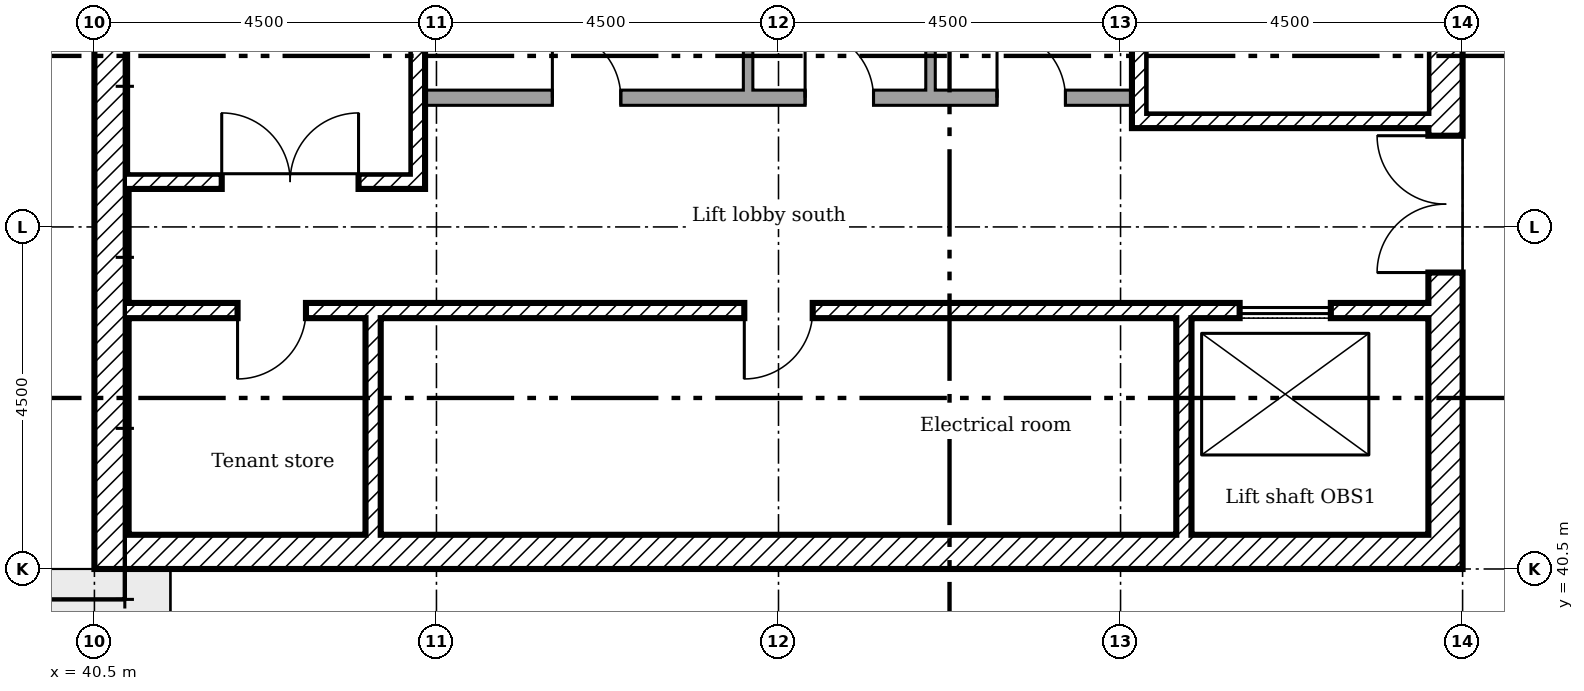
"""IFC4 building model, lengths in metres.
Left out: names, types, materials, properties, quantities, classifications, styles, units other than length and angle.
Written with IfcOpenShell. Run it as: python <this file> out.ifc"""

import sys

from ifc_helpers import new_model, si_unit, direction, frame, frame_2d, origin, place, context, subcontext, project, spatial, rectangle, extrude, element, fill, save


model = new_model("IFC4")
c1 = context("Model", 3, precision=1e-05, world=origin(), true_north=direction((0.0, 1.0)))
c2 = subcontext(c1, "Body", "Model", "MODEL_VIEW")
j1 = project(units=[si_unit("LENGTHUNIT", "METRE"), si_unit("PLANEANGLEUNIT", "RADIAN")], contexts=[c1])
p1 = place(None, origin())
s1 = spatial("IfcSite", under=j1, at=p1, CompositionType="ELEMENT")
p2 = place(p1, origin())
s2 = spatial("IfcBuilding", under=s1, at=p2, CompositionType="ELEMENT")
p3 = place(p2, frame((0.0, 0.0, 269.6)))
s3 = spatial("IfcBuildingStorey", under=s2, at=p3, CompositionType="ELEMENT", Elevation=269.6)
p4 = place(p3, frame((58.275, 40.5, 0.0), z_axis=(0.0, 0.0, 1.0), x_axis=(0.0, 1.0, 0.0)))
e1 = element("IfcWall", 1, at=p4, inside=s3, PredefinedType="SHEAR", context=c2, shape_type="SweptSolid", body=[
    extrude(rectangle(XDim=18.0, YDim=0.45, at=frame_2d((9.0, 0.0))), origin(), (0.0, 0.0, 1.0), 4.75),
])
p5 = place(p4, frame((13.15, 0.0, 0.0)))
e2 = element("IfcOpeningElement", 2, at=p5, cuts=e1, PredefinedType="OPENING", context=c2, shape_type="SweptSolid", body=[
    extrude(rectangle(XDim=1.2, YDim=2.1, at=frame_2d((0.6, 1.05))), frame((0.0, 0.235, 0.0), z_axis=(0.0, -1.0, 0.0), x_axis=(1.0, 0.0, 0.0)), (0.0, 0.0, 1.0), 0.47),
])
p6 = place(p4, frame((3.9, 0.0, 0.0)))
e3 = element("IfcOpeningElement", 3, at=p6, cuts=e1, PredefinedType="OPENING", context=c2, shape_type="SweptSolid", body=[
    extrude(rectangle(XDim=1.8, YDim=2.1, at=frame_2d((0.9, 1.05))), frame((0.0, 0.235, 0.0), z_axis=(0.0, -1.0, 0.0), x_axis=(1.0, 0.0, 0.0)), (0.0, 0.0, 1.0), 0.47),
])
p7 = place(p4, frame((11.34, 0.0, 0.0)))
e4 = element("IfcOpeningElement", 4, at=p7, cuts=e1, PredefinedType="OPENING", context=c2, shape_type="SweptSolid", body=[
    extrude(rectangle(XDim=1.2, YDim=2.1, at=frame_2d((0.6, 1.05))), frame((0.0, 0.235, 0.0), z_axis=(0.0, -1.0, 0.0), x_axis=(1.0, 0.0, 0.0)), (0.0, 0.0, 1.0), 0.47),
])
p8 = place(p3, frame((40.5, 40.725, 0.0)))
e5 = element("IfcWall", 5, at=p8, inside=s3, PredefinedType="SHEAR", context=c2, shape_type="SweptSolid", body=[
    extrude(rectangle(XDim=17.55, YDim=0.45, at=frame_2d((8.775, 0.0))), origin(), (0.0, 0.0, 1.0), 4.75),
])
p9 = place(p3, frame((40.725, 40.95, 0.0), z_axis=(0.0, 0.0, 1.0), x_axis=(0.0, 1.0, 0.0)))
e6 = element("IfcWall", 6, at=p9, inside=s3, PredefinedType="SHEAR", context=c2, shape_type="SweptSolid", body=[
    extrude(rectangle(XDim=17.1, YDim=0.45, at=frame_2d((8.55, 0.0))), origin(), (0.0, 0.0, 1.0), 4.75),
])
for number, where, z_axis, x_axis in (
    (7, (44.167, 40.95, 0.0), (0.0, 0.0, 1.0), (0.0, 1.0, 0.0)),
    (8, (54.833, 40.95, 0.0), (0.0, 0.0, 1.0), (0.0, 1.0, 0.0)),
):
    element("IfcWall", number, at=place(p3, frame(where, z_axis=z_axis, x_axis=x_axis)), inside=s3, PredefinedType="SHEAR", context=c2, shape_type="SweptSolid", body=[
        extrude(rectangle(XDim=2.85, YDim=0.2, at=frame_2d((1.425, 0.0))), origin(), (0.0, 0.0, 1.0), 4.75),
    ])
p10 = place(p3, frame((40.95, 43.9, 0.0)))
e9 = element("IfcWall", 9, at=p10, inside=s3, PredefinedType="SHEAR", context=c2, shape_type="SweptSolid", body=[
    extrude(rectangle(XDim=17.1, YDim=0.2, at=frame_2d((8.55, 0.0))), origin(), (0.0, 0.0, 1.0), 4.75),
])
p11 = place(p10, frame((1.433, 0.0, 0.0)))
e10 = element("IfcOpeningElement", 10, at=p11, cuts=e9, PredefinedType="OPENING", context=c2, shape_type="SweptSolid", body=[
    extrude(rectangle(XDim=0.9, YDim=2.1, at=frame_2d((0.45, 1.05))), frame((0.0, 0.11, 0.0), z_axis=(0.0, -1.0, 0.0), x_axis=(1.0, 0.0, 0.0)), (0.0, 0.0, 1.0), 0.22),
])
p12 = place(p10, frame((8.1, 0.0, 0.0)))
e11 = element("IfcOpeningElement", 11, at=p12, cuts=e9, PredefinedType="OPENING", context=c2, shape_type="SweptSolid", body=[
    extrude(rectangle(XDim=0.9, YDim=2.1, at=frame_2d((0.45, 1.05))), frame((0.0, 0.11, 0.0), z_axis=(0.0, -1.0, 0.0), x_axis=(1.0, 0.0, 0.0)), (0.0, 0.0, 1.0), 0.22),
])
p13 = place(p10, frame((14.617, 0.0, 0.0)))
e12 = element("IfcOpeningElement", 12, at=p13, cuts=e9, PredefinedType="OPENING", context=c2, shape_type="SweptSolid", body=[
    extrude(rectangle(XDim=1.2, YDim=2.1, at=frame_2d((0.6, 1.05))), frame((0.0, 0.11, 0.0), z_axis=(0.0, -1.0, 0.0), x_axis=(1.0, 0.0, 0.0)), (0.0, 0.0, 1.0), 0.22),
])
p14 = place(p3, frame((44.75, 45.5, 0.0), z_axis=(0.0, 0.0, 1.0), x_axis=(0.0, 1.0, 0.0)))
e13 = element("IfcWall", 13, at=p14, inside=s3, PredefinedType="SHEAR", context=c2, shape_type="SweptSolid", body=[
    extrude(rectangle(XDim=7.2, YDim=0.2, at=frame_2d((3.6, 0.0))), origin(), (0.0, 0.0, 1.0), 4.75),
])
p15 = place(p3, frame((40.95, 45.6, 0.0)))
e14 = element("IfcWall", 14, at=p15, inside=s3, PredefinedType="SHEAR", context=c2, shape_type="SweptSolid", body=[
    extrude(rectangle(XDim=3.7, YDim=0.2, at=frame_2d((1.85, 0.0))), origin(), (0.0, 0.0, 1.0), 4.75),
])
p16 = place(p15, frame((1.225, 0.0, 0.0)))
e15 = element("IfcOpeningElement", 15, at=p16, cuts=e14, PredefinedType="OPENING", context=c2, shape_type="SweptSolid", body=[
    extrude(rectangle(XDim=1.8, YDim=2.1, at=frame_2d((0.9, 1.05))), frame((0.0, 0.11, 0.0), z_axis=(0.0, -1.0, 0.0), x_axis=(1.0, 0.0, 0.0)), (0.0, 0.0, 1.0), 0.22),
])
p17 = place(p3, frame((54.15, 46.4, 0.0)))
e16 = element("IfcWall", 16, at=p17, inside=s3, PredefinedType="SHEAR", context=c2, shape_type="SweptSolid", body=[
    extrude(rectangle(XDim=3.9, YDim=0.2, at=frame_2d((1.95, 0.0))), origin(), (0.0, 0.0, 1.0), 4.75),
])
p18 = place(p3, frame((54.25, 46.5, 0.0), z_axis=(0.0, 0.0, 1.0), x_axis=(0.0, 1.0, 0.0)))
e17 = element("IfcWall", 17, at=p18, inside=s3, PredefinedType="SHEAR", context=c2, shape_type="SweptSolid", body=[
    extrude(rectangle(XDim=6.8, YDim=0.2, at=frame_2d((3.4, 0.0))), origin(), (0.0, 0.0, 1.0), 4.75),
])
p19 = place(p3, frame((44.85, 46.7, 0.0)))
e18 = element("IfcWall", 18, at=p19, inside=s3, PredefinedType="PARTITIONING", context=c2, shape_type="SweptSolid", body=[
    extrude(rectangle(XDim=9.3, YDim=0.2, at=frame_2d((4.65, 0.0))), origin(), (0.0, 0.0, 1.0), 4.75),
])
p20 = place(p19, frame((1.675, 0.0, 0.0)))
e19 = element("IfcOpeningElement", 19, at=p20, cuts=e18, PredefinedType="OPENING", context=c2, shape_type="SweptSolid", body=[
    extrude(rectangle(XDim=0.9, YDim=2.1, at=frame_2d((0.45, 1.05))), frame((0.0, 0.11, 0.0), z_axis=(0.0, -1.0, 0.0), x_axis=(1.0, 0.0, 0.0)), (0.0, 0.0, 1.0), 0.22),
])
p21 = place(p19, frame((5.0, 0.0, 0.0)))
e20 = element("IfcOpeningElement", 20, at=p21, cuts=e18, PredefinedType="OPENING", context=c2, shape_type="SweptSolid", body=[
    extrude(rectangle(XDim=0.9, YDim=2.1, at=frame_2d((0.45, 1.05))), frame((0.0, 0.11, 0.0), z_axis=(0.0, -1.0, 0.0), x_axis=(1.0, 0.0, 0.0)), (0.0, 0.0, 1.0), 0.22),
])
p22 = place(p19, frame((7.525, 0.0, 0.0)))
e21 = element("IfcOpeningElement", 21, at=p22, cuts=e18, PredefinedType="OPENING", context=c2, shape_type="SweptSolid", body=[
    extrude(rectangle(XDim=0.9, YDim=2.1, at=frame_2d((0.45, 1.05))), frame((0.0, 0.11, 0.0), z_axis=(0.0, -1.0, 0.0), x_axis=(1.0, 0.0, 0.0)), (0.0, 0.0, 1.0), 0.22),
])
p23 = place(p3, frame((49.1, 46.8, 0.0), z_axis=(0.0, 0.0, 1.0), x_axis=(0.0, 1.0, 0.0)))
e22 = element("IfcWall", 22, at=p23, inside=s3, PredefinedType="PARTITIONING", context=c2, shape_type="SweptSolid", body=[
    extrude(rectangle(XDim=4.7, YDim=0.125, at=frame_2d((2.35, 0.0))), origin(), (0.0, 0.0, 1.0), 4.75),
])
p24 = place(p3, frame((51.5, 46.8, 0.0), z_axis=(0.0, 0.0, 1.0), x_axis=(0.0, 1.0, 0.0)))
e23 = element("IfcWall", 23, at=p24, inside=s3, PredefinedType="PARTITIONING", context=c2, shape_type="SweptSolid", body=[
    extrude(rectangle(XDim=2.762, YDim=0.125, at=frame_2d((1.381, 0.0))), origin(), (0.0, 0.0, 1.0), 4.75),
])
p25 = place(p6, origin())
e24 = element("IfcDoor", 24, at=p25, inside=s3, OperationType="DOUBLE_DOOR_SINGLE_SWING", PredefinedType="DOOR", context=c2, shape_type="SweptSolid", body=[
    extrude(rectangle(XDim=1.8, YDim=2.1, at=frame_2d((0.9, 1.05))), frame((0.0, 0.025, 0.0), z_axis=(0.0, -1.0, 0.0), x_axis=(1.0, 0.0, 0.0)), (0.0, 0.0, 1.0), 0.05),
])
fill(e3, e24)
p26 = place(p16, origin())
e25 = element("IfcDoor", 25, at=p26, inside=s3, OperationType="DOUBLE_DOOR_SINGLE_SWING", PredefinedType="DOOR", context=c2, shape_type="SweptSolid", body=[
    extrude(rectangle(XDim=1.8, YDim=2.1, at=frame_2d((0.9, 1.05))), frame((0.0, 0.025, 0.0), z_axis=(0.0, -1.0, 0.0), x_axis=(1.0, 0.0, 0.0)), (0.0, 0.0, 1.0), 0.05),
])
fill(e15, e25)
p27 = place(p11, frame((0.9, 0.0, 0.0), x_axis=(-1.0, 0.0, 0.0)))
e26 = element("IfcDoor", 26, at=p27, inside=s3, OperationType="SINGLE_SWING_LEFT", PredefinedType="DOOR", context=c2, shape_type="SweptSolid", body=[
    extrude(rectangle(XDim=0.9, YDim=2.1, at=frame_2d((0.45, 1.05))), frame((0.0, 0.025, 0.0), z_axis=(0.0, -1.0, 0.0), x_axis=(1.0, 0.0, 0.0)), (0.0, 0.0, 1.0), 0.05),
])
fill(e10, e26)
p28 = place(p12, frame((0.9, 0.0, 0.0), x_axis=(-1.0, 0.0, 0.0)))
e27 = element("IfcDoor", 27, at=p28, inside=s3, OperationType="SINGLE_SWING_LEFT", PredefinedType="DOOR", context=c2, shape_type="SweptSolid", body=[
    extrude(rectangle(XDim=0.9, YDim=2.1, at=frame_2d((0.45, 1.05))), frame((0.0, 0.025, 0.0), z_axis=(0.0, -1.0, 0.0), x_axis=(1.0, 0.0, 0.0)), (0.0, 0.0, 1.0), 0.05),
])
fill(e11, e27)
p29 = place(p20, origin())
e28 = element("IfcDoor", 28, at=p29, inside=s3, OperationType="SINGLE_SWING_RIGHT", PredefinedType="DOOR", context=c2, shape_type="SweptSolid", body=[
    extrude(rectangle(XDim=0.9, YDim=2.1, at=frame_2d((0.45, 1.05))), frame((0.0, 0.025, 0.0), z_axis=(0.0, -1.0, 0.0), x_axis=(1.0, 0.0, 0.0)), (0.0, 0.0, 1.0), 0.05),
])
fill(e19, e28)
p30 = place(p21, origin())
e29 = element("IfcDoor", 29, at=p30, inside=s3, OperationType="SINGLE_SWING_RIGHT", PredefinedType="DOOR", context=c2, shape_type="SweptSolid", body=[
    extrude(rectangle(XDim=0.9, YDim=2.1, at=frame_2d((0.45, 1.05))), frame((0.0, 0.025, 0.0), z_axis=(0.0, -1.0, 0.0), x_axis=(1.0, 0.0, 0.0)), (0.0, 0.0, 1.0), 0.05),
])
fill(e20, e29)
p31 = place(p22, origin())
e30 = element("IfcDoor", 30, at=p31, inside=s3, OperationType="SINGLE_SWING_RIGHT", PredefinedType="DOOR", context=c2, shape_type="SweptSolid", body=[
    extrude(rectangle(XDim=0.9, YDim=2.1, at=frame_2d((0.45, 1.05))), frame((0.0, 0.025, 0.0), z_axis=(0.0, -1.0, 0.0), x_axis=(1.0, 0.0, 0.0)), (0.0, 0.0, 1.0), 0.05),
])
fill(e21, e30)
p32 = place(p13, origin())
e31 = element("IfcDoor", 31, at=p32, inside=s3, OperationType="SLIDING_TO_LEFT", PredefinedType="DOOR", context=c2, shape_type="SweptSolid", body=[
    extrude(rectangle(XDim=1.2, YDim=2.1, at=frame_2d((0.6, 1.05))), frame((0.0, 0.025, 0.0), z_axis=(0.0, -1.0, 0.0), x_axis=(1.0, 0.0, 0.0)), (0.0, 0.0, 1.0), 0.05),
])
fill(e12, e31)
save(model, sys.argv[1])
